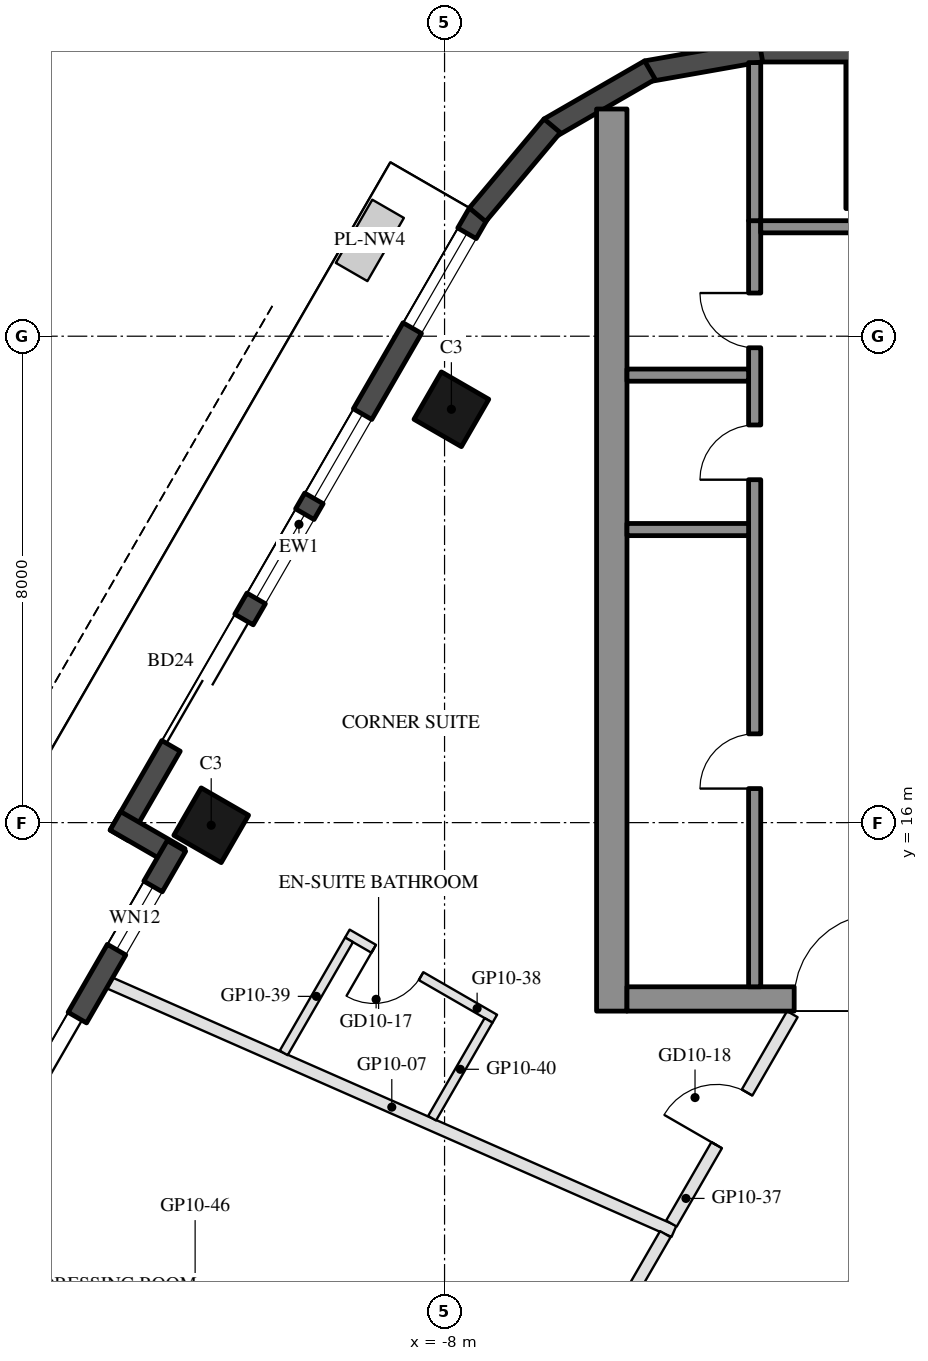
"""IFC4 building model, lengths in metres.
Left out: names, types, materials, properties, quantities, classifications, styles, units other than length and angle.
Written with IfcOpenShell. Run it as: python <this file> out.ifc"""

import sys

from ifc_helpers import new_model, si_unit, direction, frame, frame_2d, origin, origin_2d, place, context, subcontext, project, spatial, rectangle, hollow_rectangle, extrude, element, fill, save


model = new_model("IFC4")
c1 = context("Model", 3, precision=1e-05, world=origin(), true_north=direction((0.0, 1.0)))
c2 = subcontext(c1, "Body", "Model", "MODEL_VIEW")
j1 = project(units=[si_unit("LENGTHUNIT", "METRE"), si_unit("PLANEANGLEUNIT", "RADIAN")], contexts=[c1])
p1 = place(None, origin())
s1 = spatial("IfcSite", under=j1, at=p1, CompositionType="ELEMENT")
p2 = place(p1, origin())
s2 = spatial("IfcBuilding", under=s1, at=p2, CompositionType="ELEMENT")
p3 = place(p2, frame((0.0, 0.0, 116.8)))
s3 = spatial("IfcBuildingStorey", under=s2, at=p3, CompositionType="ELEMENT", Elevation=116.8)
for number, where, z_axis, x_axis in (
    (1, (-7.888, 22.798, 0.0), (0.0, 0.0, 1.0), (0.5, 0.866, 0.0)),
    (2, (-11.838, 15.957, 0.0), (0.0, 0.0, 1.0), (0.5, 0.866, 0.0)),
):
    element("IfcColumn", number, at=place(p3, frame(where, z_axis=z_axis, x_axis=x_axis)), inside=s3, PredefinedType="COLUMN", context=c2, shape_type="SweptSolid", body=[
        extrude(hollow_rectangle(XDim=0.9, YDim=0.9, WallThickness=0.04, at=origin_2d()), origin(), (0.0, 0.0, 1.0), 3.7),
    ])
p4 = place(p3, frame((0.0, 27.3, 0.0), z_axis=(0.0, 0.0, 1.0), x_axis=(1.0, 0.0, 0.0)))
e3 = element("IfcColumn", 3, at=p4, inside=s3, PredefinedType="COLUMN", context=c2, shape_type="SweptSolid", body=[
    extrude(hollow_rectangle(XDim=2.8, YDim=2.4, WallThickness=0.07, at=origin_2d()), origin(), (0.0, 0.0, 1.0), 3.7),
])
p5 = place(p3, frame((-7.441, 26.022, 0.0), z_axis=(0.0, 0.0, 1.0), x_axis=(-0.499992533062, -0.86602971478, 0.0)))
e4 = element("IfcWall", 4, at=p5, inside=s3, PredefinedType="SOLIDWALL", context=c2, shape_type="SweptSolid", body=[
    extrude(rectangle(XDim=11.816, YDim=0.35, at=frame_2d((5.908, 0.0))), origin(), (0.0, 0.0, 1.0), 3.55),
])
p6 = place(p5, frame((0.381, 0.0, 0.3)))
e5 = element("IfcOpeningElement", 5, at=p6, cuts=e4, PredefinedType="OPENING", context=c2, shape_type="SweptSolid", body=[
    extrude(rectangle(XDim=1.8, YDim=2.65, at=frame_2d((0.9, 1.325))), frame((0.0, 0.185, 0.0), z_axis=(0.0, -1.0, 0.0), x_axis=(1.0, 0.0, 0.0)), (0.0, 0.0, 1.0), 0.37),
])
p7 = place(p5, frame((7.716, 0.0, 0.0)))
e6 = element("IfcOpeningElement", 6, at=p7, cuts=e4, PredefinedType="OPENING", context=c2, shape_type="SweptSolid", body=[
    extrude(rectangle(XDim=2.4, YDim=2.4, at=frame_2d((1.2, 1.2))), frame((0.0, 0.185, 0.0), z_axis=(0.0, -1.0, 0.0), x_axis=(1.0, 0.0, 0.0)), (0.0, 0.0, 1.0), 0.37),
])
p8 = place(p5, frame((3.815, 0.0, 0.3)))
e7 = element("IfcOpeningElement", 7, at=p8, cuts=e4, PredefinedType="OPENING", context=c2, shape_type="SweptSolid", body=[
    extrude(rectangle(XDim=1.6, YDim=2.65, at=frame_2d((0.8, 1.325))), frame((0.0, 0.185, 0.0), z_axis=(0.0, -1.0, 0.0), x_axis=(1.0, 0.0, 0.0)), (0.0, 0.0, 1.0), 0.37),
])
p9 = place(p5, frame((5.715, 0.0, 0.3)))
e8 = element("IfcOpeningElement", 8, at=p9, cuts=e4, PredefinedType="OPENING", context=c2, shape_type="SweptSolid", body=[
    extrude(rectangle(XDim=1.6, YDim=2.65, at=frame_2d((0.8, 1.325))), frame((0.0, 0.185, 0.0), z_axis=(0.0, -1.0, 0.0), x_axis=(1.0, 0.0, 0.0)), (0.0, 0.0, 1.0), 0.37),
])
p10 = place(p3, frame((-13.413, 16.029, 0.0), z_axis=(0.0, 0.0, 1.0), x_axis=(0.866005645448, -0.500034220881, 0.0)))
e9 = element("IfcWall", 9, at=p10, inside=s3, PredefinedType="SOLIDWALL", context=c2, shape_type="SweptSolid", body=[
    extrude(rectangle(XDim=1.22, YDim=0.35, at=frame_2d((0.61, 0.0))), origin(), (0.0, 0.0, 1.0), 3.55),
])
p11 = place(p3, frame((-12.409, 15.617, 0.0), z_axis=(0.0, 0.0, 1.0), x_axis=(-0.500003597184, -0.866023326939, 0.0)))
e10 = element("IfcWall", 10, at=p11, inside=s3, PredefinedType="SOLIDWALL", context=c2, shape_type="SweptSolid", body=[
    extrude(rectangle(XDim=6.74, YDim=0.35, at=frame_2d((3.37, 0.0))), origin(), (0.0, 0.0, 1.0), 3.55),
])
p12 = place(p11, frame((0.77, 0.0, 0.3)))
e11 = element("IfcOpeningElement", 11, at=p12, cuts=e10, PredefinedType="OPENING", context=c2, shape_type="SweptSolid", body=[
    extrude(rectangle(XDim=1.2, YDim=2.65, at=frame_2d((0.6, 1.325))), frame((0.0, 0.185, 0.0), z_axis=(0.0, -1.0, 0.0), x_axis=(1.0, 0.0, 0.0)), (0.0, 0.0, 1.0), 0.37),
])
p13 = place(p11, frame((3.26, 0.0, 0.0)))
e12 = element("IfcOpeningElement", 12, at=p13, cuts=e10, PredefinedType="OPENING", context=c2, shape_type="SweptSolid", body=[
    extrude(rectangle(XDim=2.4, YDim=2.4, at=frame_2d((1.2, 1.2))), frame((0.0, 0.185, 0.0), z_axis=(0.0, -1.0, 0.0), x_axis=(1.0, 0.0, 0.0)), (0.0, 0.0, 1.0), 0.37),
])
p14 = place(p3, frame((2.829, 28.685, 0.0), z_axis=(0.0, 0.0, 1.0), x_axis=(-1.0, 0.0, 0.0)))
e13 = element("IfcWall", 13, at=p14, inside=s3, PredefinedType="SOLIDWALL", context=c2, shape_type="SweptSolid", body=[
    extrude(rectangle(XDim=5.658, YDim=0.35, at=frame_2d((2.829, 0.0))), origin(), (0.0, 0.0, 1.0), 3.55),
])
for number, where, z_axis, x_axis in (
    (14, (-2.799, 28.688, 0.0), (0.0, 0.0, 1.0), (-0.985, -0.174, 0.0)),
    (15, (-4.623, 28.377, 0.0), (0.0, 0.0, 1.0), (-0.866, -0.5, 0.0)),
):
    element("IfcWall", number, at=place(p3, frame(where, z_axis=z_axis, x_axis=x_axis)), inside=s3, PredefinedType="SOLIDWALL", context=c2, shape_type="SweptSolid", body=[
        extrude(rectangle(XDim=1.91, YDim=0.35, at=frame_2d((0.955, 0.0))), origin(), (0.0, 0.0, 1.0), 3.55),
    ])
p15 = place(p3, frame((-6.23, 27.461, 0.0), z_axis=(0.0, 0.0, 1.0), x_axis=(-0.642808304945, -0.766027077259, 0.0)))
e16 = element("IfcWall", 16, at=p15, inside=s3, PredefinedType="SOLIDWALL", context=c2, shape_type="SweptSolid", body=[
    extrude(rectangle(XDim=1.91, YDim=0.35, at=frame_2d((0.955, 0.0))), origin(), (0.0, 0.0, 1.0), 3.55),
])
p16 = place(p3, frame((-5.25, 12.9, 0.0), z_axis=(0.0, 0.0, 1.0), x_axis=(0.0, 1.0, 0.0)))
e17 = element("IfcWall", 17, at=p16, inside=s3, PredefinedType="SHEAR", context=c2, shape_type="SweptSolid", body=[
    extrude(rectangle(XDim=14.837, YDim=0.5, at=frame_2d((7.418, 0.0))), origin(), (0.0, 0.0, 1.0), 3.5),
])
p17 = place(p3, frame((5.0, 13.1, 0.0), z_axis=(0.0, 0.0, 1.0), x_axis=(-1.0, 0.0, 0.0)))
e18 = element("IfcWall", 18, at=p17, inside=s3, PredefinedType="SHEAR", context=c2, shape_type="SweptSolid", body=[
    extrude(rectangle(XDim=10.0, YDim=0.4, at=frame_2d((5.0, 0.0))), origin(), (0.0, 0.0, 1.0), 3.5),
])
p18 = place(p17, frame((3.55, 0.0, 0.0)))
e19 = element("IfcOpeningElement", 19, at=p18, cuts=e18, PredefinedType="OPENING", context=c2, shape_type="SweptSolid", body=[
    extrude(rectangle(XDim=1.1, YDim=2.1, at=frame_2d((0.55, 1.05))), frame((0.0, 0.21, 0.0), z_axis=(0.0, -1.0, 0.0), x_axis=(1.0, 0.0, 0.0)), (0.0, 0.0, 1.0), 0.42),
])
p19 = place(p17, frame((5.85, 0.0, 0.0)))
e20 = element("IfcOpeningElement", 20, at=p19, cuts=e18, PredefinedType="OPENING", context=c2, shape_type="SweptSolid", body=[
    extrude(rectangle(XDim=1.4, YDim=2.1, at=frame_2d((0.7, 1.05))), frame((0.0, 0.21, 0.0), z_axis=(0.0, -1.0, 0.0), x_axis=(1.0, 0.0, 0.0)), (0.0, 0.0, 1.0), 0.42),
])
p20 = place(p3, frame((-2.9, 13.3, 0.0), z_axis=(0.0, 0.0, 1.0), x_axis=(0.0, 1.0, 0.0)))
e21 = element("IfcWall", 21, at=p20, inside=s3, PredefinedType="SHEAR", context=c2, shape_type="SweptSolid", body=[
    extrude(rectangle(XDim=12.6, YDim=0.2, at=frame_2d((6.3, 0.0))), origin(), (0.0, 0.0, 1.0), 3.5),
])
p21 = place(p20, frame((3.26, 0.0, 0.0)))
e22 = element("IfcOpeningElement", 22, at=p21, cuts=e21, PredefinedType="OPENING", context=c2, shape_type="SweptSolid", body=[
    extrude(rectangle(XDim=0.9, YDim=2.1, at=frame_2d((0.45, 1.05))), frame((0.0, 0.11, 0.0), z_axis=(0.0, -1.0, 0.0), x_axis=(1.0, 0.0, 0.0)), (0.0, 0.0, 1.0), 0.22),
])
p22 = place(p20, frame((8.34, 0.0, 0.0)))
e23 = element("IfcOpeningElement", 23, at=p22, cuts=e21, PredefinedType="OPENING", context=c2, shape_type="SweptSolid", body=[
    extrude(rectangle(XDim=0.9, YDim=2.1, at=frame_2d((0.45, 1.05))), frame((0.0, 0.11, 0.0), z_axis=(0.0, -1.0, 0.0), x_axis=(1.0, 0.0, 0.0)), (0.0, 0.0, 1.0), 0.22),
])
p23 = place(p20, frame((10.51, 0.0, 0.0)))
e24 = element("IfcOpeningElement", 24, at=p23, cuts=e21, PredefinedType="OPENING", context=c2, shape_type="SweptSolid", body=[
    extrude(rectangle(XDim=0.9, YDim=2.1, at=frame_2d((0.45, 1.05))), frame((0.0, 0.11, 0.0), z_axis=(0.0, -1.0, 0.0), x_axis=(1.0, 0.0, 0.0)), (0.0, 0.0, 1.0), 0.22),
])
p24 = place(p3, frame((-0.4, 25.8, 0.0), z_axis=(0.0, 0.0, 1.0), x_axis=(-1.0, 0.0, 0.0)))
e25 = element("IfcWall", 25, at=p24, inside=s3, PredefinedType="SHEAR", context=c2, shape_type="SweptSolid", body=[
    extrude(rectangle(XDim=2.4, YDim=0.2, at=frame_2d((1.2, 0.0))), origin(), (0.0, 0.0, 1.0), 3.5),
])
for number, where, z_axis, x_axis in (
    (26, (-3.0, 20.82, 0.0), (0.0, 0.0, 1.0), (-1.0, 0.0, 0.0)),
    (27, (-3.0, 23.36, 0.0), (0.0, 0.0, 1.0), (-1.0, 0.0, 0.0)),
):
    element("IfcWall", number, at=place(p3, frame(where, z_axis=z_axis, x_axis=x_axis)), inside=s3, PredefinedType="SHEAR", context=c2, shape_type="SweptSolid", body=[
        extrude(rectangle(XDim=2.0, YDim=0.2, at=frame_2d((1.0, 0.0))), origin(), (0.0, 0.0, 1.0), 3.5),
    ])
p25 = place(p3, frame((-2.9, 25.9, 0.0), z_axis=(0.0, 0.0, 1.0), x_axis=(0.0, 1.0, 0.0)))
e28 = element("IfcWall", 28, at=p25, inside=s3, PredefinedType="SHEAR", context=c2, shape_type="SweptSolid", body=[
    extrude(rectangle(XDim=2.6, YDim=0.2, at=frame_2d((1.3, 0.0))), origin(), (0.0, 0.0, 1.0), 3.5),
])
p26 = place(p3, frame((-13.508, 13.363, 0.0), z_axis=(0.0, 0.0, 1.0), x_axis=(0.915297635711, -0.402778149932, 0.0)))
e29 = element("IfcWall", 29, at=p26, inside=s3, PredefinedType="PARTITIONING", context=c2, shape_type="SweptSolid", body=[
    extrude(rectangle(XDim=10.14, YDim=0.2, at=frame_2d((5.07, 0.0))), origin(), (0.0, 0.0, 1.0), 2.96),
])
p27 = place(p3, frame((-4.269, 9.406, 0.0), z_axis=(0.0, 0.0, 1.0), x_axis=(0.499968678846, 0.866043486306, 0.0)))
e30 = element("IfcWall", 30, at=p27, inside=s3, PredefinedType="PARTITIONING", context=c2, shape_type="SweptSolid", body=[
    extrude(rectangle(XDim=3.977, YDim=0.2, at=frame_2d((1.988, 0.0))), origin(), (0.0, 0.0, 1.0), 2.95),
])
p28 = place(p27, frame((1.488, 0.0, 0.0)))
e31 = element("IfcOpeningElement", 31, at=p28, cuts=e30, PredefinedType="OPENING", context=c2, shape_type="SweptSolid", body=[
    extrude(rectangle(XDim=1.0, YDim=2.1, at=frame_2d((0.5, 1.05))), frame((0.0, 0.11, 0.0), z_axis=(0.0, -1.0, 0.0), x_axis=(1.0, 0.0, 0.0)), (0.0, 0.0, 1.0), 0.22),
])
p29 = place(p3, frame((-7.174, 12.775, 0.0), z_axis=(0.0, 0.0, 1.0), x_axis=(-0.866034573852, 0.49998411664, 0.0)))
e32 = element("IfcWall", 32, at=p29, inside=s3, PredefinedType="PARTITIONING", context=c2, shape_type="SweptSolid", body=[
    extrude(rectangle(XDim=2.8, YDim=0.15, at=frame_2d((1.4, 0.0))), origin(), (0.0, 0.0, 1.0), 3.55),
])
p30 = place(p29, frame((1.4, 0.0, 0.0)))
e33 = element("IfcOpeningElement", 33, at=p30, cuts=e32, PredefinedType="OPENING", context=c2, shape_type="SweptSolid", body=[
    extrude(rectangle(XDim=0.9, YDim=2.1, at=frame_2d((0.45, 1.05))), frame((0.0, 0.085, 0.0), z_axis=(0.0, -1.0, 0.0), x_axis=(1.0, 0.0, 0.0)), (0.0, 0.0, 1.0), 0.17),
])
p31 = place(p3, frame((-9.571, 14.073, 0.0), z_axis=(0.0, 0.0, 1.0), x_axis=(-0.50005036918, -0.865996321171, 0.0)))
e34 = element("IfcWall", 34, at=p31, inside=s3, PredefinedType="PARTITIONING", context=c2, shape_type="SweptSolid", body=[
    extrude(rectangle(XDim=2.148, YDim=0.15, at=frame_2d((1.074, 0.0))), origin(), (0.0, 0.0, 1.0), 3.55),
])
p32 = place(p3, frame((-7.276, 12.748, 0.0), z_axis=(0.0, 0.0, 1.0), x_axis=(-0.500067438192, -0.865986464825, 0.0)))
e35 = element("IfcWall", 35, at=p32, inside=s3, PredefinedType="PARTITIONING", context=c2, shape_type="SweptSolid", body=[
    extrude(rectangle(XDim=1.858, YDim=0.15, at=frame_2d((0.929, 0.0))), origin(), (0.0, 0.0, 1.0), 3.55),
])
p33 = place(p3, frame((-8.475, 2.122, 0.0), z_axis=(0.0, 0.0, 1.0), x_axis=(0.500005592383, 0.866022174996, 0.0)))
e36 = element("IfcWall", 36, at=p33, inside=s3, PredefinedType="PARTITIONING", context=c2, shape_type="SweptSolid", body=[
    extrude(rectangle(XDim=8.21, YDim=0.2, at=frame_2d((4.105, 0.0))), origin(), (0.0, 0.0, 1.0), 2.95),
])
p34 = place(p33, frame((2.45, 0.0, 0.0)))
e37 = element("IfcOpeningElement", 37, at=p34, cuts=e36, PredefinedType="OPENING", context=c2, shape_type="SweptSolid", body=[
    extrude(rectangle(XDim=1.0, YDim=2.1, at=frame_2d((0.5, 1.05))), frame((0.0, 0.11, 0.0), z_axis=(0.0, -1.0, 0.0), x_axis=(1.0, 0.0, 0.0)), (0.0, 0.0, 1.0), 0.22),
])
p35 = place(p6, origin())
e38 = element("IfcWindow", 38, at=p35, inside=s3, PartitioningType="SINGLE_PANEL", PredefinedType="WINDOW", context=c2, shape_type="SweptSolid", body=[
    extrude(rectangle(XDim=1.8, YDim=2.65, at=frame_2d((0.9, 1.325))), frame((0.0, 0.03, 0.0), z_axis=(0.0, -1.0, 0.0), x_axis=(1.0, 0.0, 0.0)), (0.0, 0.0, 1.0), 0.06),
])
fill(e5, e38)
p36 = place(p7, frame((2.4, 0.0, 0.0), z_axis=(0.0, 0.0, 1.0), x_axis=(-1.0, 0.0, 0.0)))
e39 = element("IfcDoor", 39, at=p36, inside=s3, OperationType="SLIDING_TO_LEFT", PredefinedType="DOOR", context=c2, shape_type="SweptSolid", body=[
    extrude(rectangle(XDim=2.4, YDim=2.4, at=frame_2d((1.2, 1.2))), frame((0.0, 0.025, 0.0), z_axis=(0.0, -1.0, 0.0), x_axis=(1.0, 0.0, 0.0)), (0.0, 0.0, 1.0), 0.05),
])
fill(e6, e39)
p37 = place(p8, origin())
e40 = element("IfcWindow", 40, at=p37, inside=s3, PartitioningType="SINGLE_PANEL", PredefinedType="WINDOW", context=c2, shape_type="SweptSolid", body=[
    extrude(rectangle(XDim=1.6, YDim=2.65, at=frame_2d((0.8, 1.325))), frame((0.0, 0.03, 0.0), z_axis=(0.0, -1.0, 0.0), x_axis=(1.0, 0.0, 0.0)), (0.0, 0.0, 1.0), 0.06),
])
fill(e7, e40)
p38 = place(p9, origin())
e41 = element("IfcWindow", 41, at=p38, inside=s3, PartitioningType="SINGLE_PANEL", PredefinedType="WINDOW", context=c2, shape_type="SweptSolid", body=[
    extrude(rectangle(XDim=1.6, YDim=2.65, at=frame_2d((0.8, 1.325))), frame((0.0, 0.03, 0.0), z_axis=(0.0, -1.0, 0.0), x_axis=(1.0, 0.0, 0.0)), (0.0, 0.0, 1.0), 0.06),
])
fill(e8, e41)
p39 = place(p12, origin())
e42 = element("IfcWindow", 42, at=p39, inside=s3, PartitioningType="SINGLE_PANEL", PredefinedType="WINDOW", context=c2, shape_type="SweptSolid", body=[
    extrude(rectangle(XDim=1.2, YDim=2.65, at=frame_2d((0.6, 1.325))), frame((0.0, 0.03, 0.0), z_axis=(0.0, -1.0, 0.0), x_axis=(1.0, 0.0, 0.0)), (0.0, 0.0, 1.0), 0.06),
])
fill(e11, e42)
p40 = place(p13, frame((2.4, 0.0, 0.0), z_axis=(0.0, 0.0, 1.0), x_axis=(-1.0, 0.0, 0.0)))
e43 = element("IfcDoor", 43, at=p40, inside=s3, OperationType="SLIDING_TO_LEFT", PredefinedType="DOOR", context=c2, shape_type="SweptSolid", body=[
    extrude(rectangle(XDim=2.4, YDim=2.4, at=frame_2d((1.2, 1.2))), frame((0.0, 0.025, 0.0), z_axis=(0.0, -1.0, 0.0), x_axis=(1.0, 0.0, 0.0)), (0.0, 0.0, 1.0), 0.05),
])
fill(e12, e43)
p41 = place(p21, origin())
e44 = element("IfcDoor", 44, at=p41, inside=s3, OperationType="SINGLE_SWING_LEFT", PredefinedType="DOOR", context=c2, shape_type="SweptSolid", body=[
    extrude(rectangle(XDim=0.9, YDim=2.1, at=frame_2d((0.45, 1.05))), frame((0.0, 0.025, 0.0), z_axis=(0.0, -1.0, 0.0), x_axis=(1.0, 0.0, 0.0)), (0.0, 0.0, 1.0), 0.05),
])
fill(e22, e44)
p42 = place(p22, origin())
e45 = element("IfcDoor", 45, at=p42, inside=s3, OperationType="SINGLE_SWING_LEFT", PredefinedType="DOOR", context=c2, shape_type="SweptSolid", body=[
    extrude(rectangle(XDim=0.9, YDim=2.1, at=frame_2d((0.45, 1.05))), frame((0.0, 0.025, 0.0), z_axis=(0.0, -1.0, 0.0), x_axis=(1.0, 0.0, 0.0)), (0.0, 0.0, 1.0), 0.05),
])
fill(e23, e45)
p43 = place(p23, origin())
e46 = element("IfcDoor", 46, at=p43, inside=s3, OperationType="SINGLE_SWING_RIGHT", PredefinedType="DOOR", context=c2, shape_type="SweptSolid", body=[
    extrude(rectangle(XDim=0.9, YDim=2.1, at=frame_2d((0.45, 1.05))), frame((0.0, 0.025, 0.0), z_axis=(0.0, -1.0, 0.0), x_axis=(1.0, 0.0, 0.0)), (0.0, 0.0, 1.0), 0.05),
])
fill(e24, e46)
p44 = place(p19, frame((1.4, 0.0, 0.0), z_axis=(0.0, 0.0, 1.0), x_axis=(-1.0, 0.0, 0.0)))
e47 = element("IfcDoor", 47, at=p44, inside=s3, OperationType="DOUBLE_DOOR_SINGLE_SWING", PredefinedType="DOOR", context=c2, shape_type="SweptSolid", body=[
    extrude(rectangle(XDim=1.4, YDim=2.1, at=frame_2d((0.7, 1.05))), frame((0.0, 0.025, 0.0), z_axis=(0.0, -1.0, 0.0), x_axis=(1.0, 0.0, 0.0)), (0.0, 0.0, 1.0), 0.05),
])
fill(e20, e47)
p45 = place(p30, origin())
e48 = element("IfcDoor", 48, at=p45, inside=s3, OperationType="SINGLE_SWING_RIGHT", PredefinedType="DOOR", context=c2, shape_type="SweptSolid", body=[
    extrude(rectangle(XDim=0.9, YDim=2.1, at=frame_2d((0.45, 1.05))), frame((0.0, 0.025, 0.0), z_axis=(0.0, -1.0, 0.0), x_axis=(1.0, 0.0, 0.0)), (0.0, 0.0, 1.0), 0.05),
])
fill(e33, e48)
p46 = place(p28, origin())
e49 = element("IfcDoor", 49, at=p46, inside=s3, OperationType="SINGLE_SWING_LEFT", PredefinedType="DOOR", context=c2, shape_type="SweptSolid", body=[
    extrude(rectangle(XDim=1.0, YDim=2.1, at=frame_2d((0.5, 1.05))), frame((0.0, 0.025, 0.0), z_axis=(0.0, -1.0, 0.0), x_axis=(1.0, 0.0, 0.0)), (0.0, 0.0, 1.0), 0.05),
])
fill(e31, e49)
save(model, sys.argv[1])
